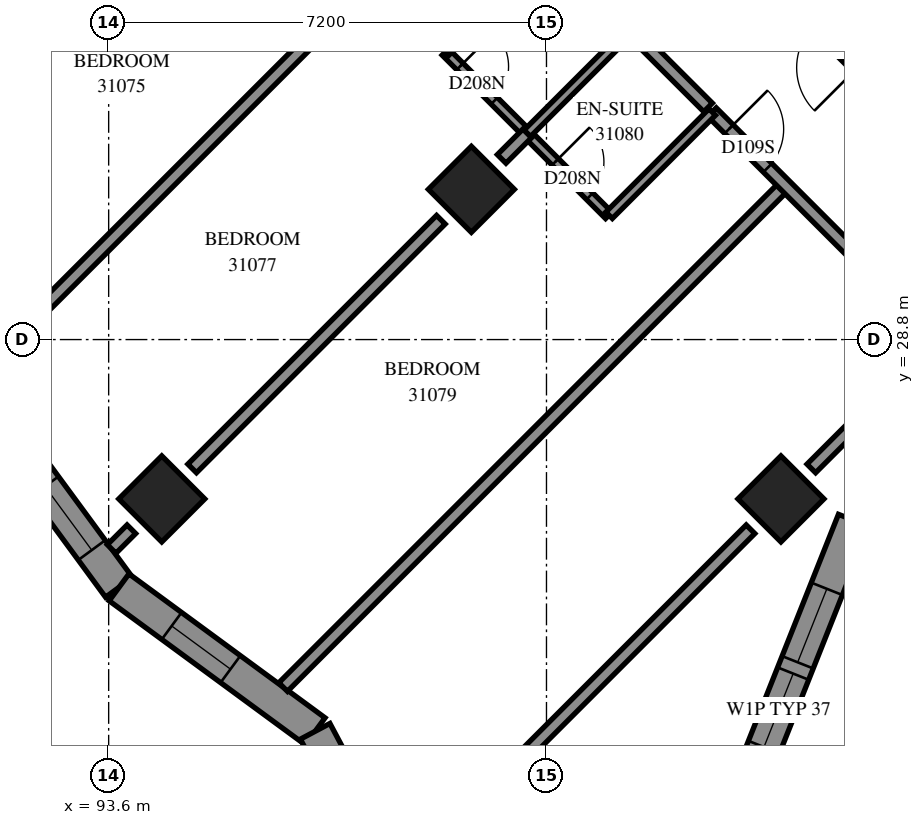
"""IFC4 building model, lengths in metres.
Left out: names, types, materials, properties, quantities, classifications, styles, units other than length and angle.
Written with IfcOpenShell. Run it as: python <this file> out.ifc"""

import sys

from ifc_helpers import new_model, si_unit, direction, frame, frame_2d, origin, origin_2d, place, context, subcontext, project, spatial, polyline, rectangle, outline, extrude, element, fill, save


model = new_model("IFC4")
c1 = context("Model", 3, precision=1e-05, world=origin(), true_north=direction((0.0, 1.0)))
c2 = subcontext(c1, "Body", "Model", "MODEL_VIEW")
j1 = project(units=[si_unit("LENGTHUNIT", "METRE"), si_unit("PLANEANGLEUNIT", "RADIAN")], contexts=[c1])
p1 = place(None, origin())
s1 = spatial("IfcSite", under=j1, at=p1, CompositionType="ELEMENT")
p2 = place(p1, origin())
s2 = spatial("IfcBuilding", under=s1, at=p2, CompositionType="ELEMENT")
p3 = place(p2, frame((0.0, 0.0, 115.2)))
s3 = spatial("IfcBuildingStorey", under=s2, at=p3, CompositionType="ELEMENT", Elevation=115.2)
for number, where, z_axis, x_axis in (
    (1, (99.565, 31.271, 0.0), (0.0, 0.0, 1.0), (0.707, -0.707, 0.0)),
    (2, (94.474, 26.18, 0.0), (0.0, 0.0, 1.0), (0.707, -0.707, 0.0)),
    (3, (104.656, 26.18, 0.0), (0.0, 0.0, 1.0), (0.707, -0.707, 0.0)),
):
    element("IfcColumn", number, at=place(p3, frame(where, z_axis=z_axis, x_axis=x_axis)), inside=s3, PredefinedType="COLUMN", context=c2, shape_type="SweptSolid", body=[
        extrude(rectangle(XDim=1.0, YDim=1.0, at=origin_2d()), origin(), (0.0, 0.0, 1.0), 3.1),
    ])
p4 = place(p3, frame((103.808, 20.667, 0.0), z_axis=(0.0, 0.0, 1.0), x_axis=(0.3692366636, 0.9293354003, 0.0)))
e4 = element("IfcWall", 4, at=p4, inside=s3, PredefinedType="SOLIDWALL", context=c2, shape_type="SweptSolid", body=[
    extrude(outline(polyline([(-0.124, -0.275), (5.431, -0.275), (5.668, 0.275), (0.124, 0.275), (-0.124, -0.275)])), origin(), (0.0, 0.0, 1.0), 3.1),
])
p5 = place(p4, frame((1.541, 0.0, 0.5)))
e5 = element("IfcOpeningElement", 5, at=p5, cuts=e4, PredefinedType="OPENING", context=c2, shape_type="SweptSolid", body=[
    extrude(rectangle(XDim=1.3, YDim=2.45, at=frame_2d((0.65, 1.225))), frame((0.0, 0.285, 0.0), z_axis=(0.0, -1.0, 0.0), x_axis=(1.0, 0.0, 0.0)), (0.0, 0.0, 1.0), 0.57),
])
p6 = place(p4, frame((3.041, 0.0, 0.5)))
e6 = element("IfcOpeningElement", 6, at=p6, cuts=e4, PredefinedType="OPENING", context=c2, shape_type="SweptSolid", body=[
    extrude(rectangle(XDim=1.3, YDim=2.45, at=frame_2d((0.65, 1.225))), frame((0.0, 0.285, 0.0), z_axis=(0.0, -1.0, 0.0), x_axis=(1.0, 0.0, 0.0)), (0.0, 0.0, 1.0), 0.57),
])
p7 = place(p3, frame((105.857, 25.825, 0.0), z_axis=(0.0, 0.0, 1.0), x_axis=(0.9293292169, 0.3692522262, 0.0)))
e7 = element("IfcWall", 7, at=p7, inside=s3, PredefinedType="SOLIDWALL", context=c2, shape_type="SweptSolid", body=[
    extrude(outline(polyline([(0.119, -0.275), (5.674, -0.275), (5.426, 0.275), (-0.119, 0.275), (0.119, -0.275)])), origin(), (0.0, 0.0, 1.0), 3.1),
])
p8 = place(p7, frame((0.653, 0.0, 0.5)))
e8 = element("IfcOpeningElement", 8, at=p8, cuts=e7, PredefinedType="OPENING", context=c2, shape_type="SweptSolid", body=[
    extrude(rectangle(XDim=1.2, YDim=2.45, at=frame_2d((0.6, 1.225))), frame((0.0, 0.285, 0.0), z_axis=(0.0, -1.0, 0.0), x_axis=(1.0, 0.0, 0.0)), (0.0, 0.0, 1.0), 0.57),
])
p9 = place(p7, frame((3.166, 0.0, 0.5)))
e9 = element("IfcOpeningElement", 9, at=p9, cuts=e7, PredefinedType="OPENING", context=c2, shape_type="SweptSolid", body=[
    extrude(rectangle(XDim=1.2, YDim=2.45, at=frame_2d((0.6, 1.225))), frame((0.0, 0.285, 0.0), z_axis=(0.0, -1.0, 0.0), x_axis=(1.0, 0.0, 0.0)), (0.0, 0.0, 1.0), 0.57),
])
p10 = place(p3, frame((91.415, 27.934, 0.0), z_axis=(0.0, 0.0, 1.0), x_axis=(0.5918046853, -0.8060813944, 0.0)))
e10 = element("IfcWall", 10, at=p10, inside=s3, PredefinedType="SOLIDWALL", context=c2, shape_type="SweptSolid", body=[
    extrude(outline(polyline([(0.042, -0.275), (4.022, -0.275), (3.938, 0.275), (-0.042, 0.275), (0.042, -0.275)])), origin(), (0.0, 0.0, 1.0), 3.1),
])
p11 = place(p10, frame((0.421, 0.0, 0.5)))
e11 = element("IfcOpeningElement", 11, at=p11, cuts=e10, PredefinedType="OPENING", context=c2, shape_type="SweptSolid", body=[
    extrude(rectangle(XDim=1.3, YDim=2.45, at=frame_2d((0.65, 1.225))), frame((0.0, 0.285, 0.0), z_axis=(0.0, -1.0, 0.0), x_axis=(1.0, 0.0, 0.0)), (0.0, 0.0, 1.0), 0.57),
])
p12 = place(p10, frame((1.921, 0.0, 0.5)))
e12 = element("IfcOpeningElement", 12, at=p12, cuts=e10, PredefinedType="OPENING", context=c2, shape_type="SweptSolid", body=[
    extrude(rectangle(XDim=1.3, YDim=2.45, at=frame_2d((0.65, 1.225))), frame((0.0, 0.285, 0.0), z_axis=(0.0, -1.0, 0.0), x_axis=(1.0, 0.0, 0.0)), (0.0, 0.0, 1.0), 0.57),
])
p13 = place(p3, frame((93.771, 24.726, 0.0), z_axis=(0.0, 0.0, 1.0), x_axis=(0.8060798805, -0.5918067474, 0.0)))
e13 = element("IfcWall", 13, at=p13, inside=s3, PredefinedType="SOLIDWALL", context=c2, shape_type="SweptSolid", body=[
    extrude(outline(polyline([(-0.042, -0.275), (3.938, -0.275), (4.064, 0.275), (0.042, 0.275), (-0.042, -0.275)])), origin(), (0.0, 0.0, 1.0), 3.1),
])
p14 = place(p13, frame((1.073, 0.0, 0.5)))
e14 = element("IfcOpeningElement", 14, at=p14, cuts=e13, PredefinedType="OPENING", context=c2, shape_type="SweptSolid", body=[
    extrude(rectangle(XDim=1.2, YDim=2.45, at=frame_2d((0.6, 1.225))), frame((0.0, 0.285, 0.0), z_axis=(0.0, -1.0, 0.0), x_axis=(1.0, 0.0, 0.0)), (0.0, 0.0, 1.0), 0.57),
])
p15 = place(p3, frame((96.996, 22.358, 0.0), z_axis=(0.0, 0.0, 1.0), x_axis=(0.469436121, -0.8829664367, 0.0)))
e15 = element("IfcWall", 15, at=p15, inside=s3, PredefinedType="SOLIDWALL", context=c2, shape_type="SweptSolid", body=[
    extrude(outline(polyline([(0.063, -0.275), (4.177, -0.275), (3.7, 0.275), (-0.063, 0.275), (0.063, -0.275)])), origin(), (0.0, 0.0, 1.0), 3.1),
])
p16 = place(p15, frame((0.919, 0.0, 0.5)))
e16 = element("IfcOpeningElement", 16, at=p16, cuts=e15, PredefinedType="OPENING", context=c2, shape_type="SweptSolid", body=[
    extrude(rectangle(XDim=1.2, YDim=2.45, at=frame_2d((0.6, 1.225))), frame((0.0, 0.285, 0.0), z_axis=(0.0, -1.0, 0.0), x_axis=(1.0, 0.0, 0.0)), (0.0, 0.0, 1.0), 0.57),
])
p17 = place(p3, frame((96.469, 23.086, 0.0), z_axis=(0.0, 0.0, 1.0), x_axis=(0.7071067812, 0.7071067812, 0.0)))
e17 = element("IfcWall", 17, at=p17, inside=s3, PredefinedType="PARTITIONING", context=c2, shape_type="SweptSolid", body=[
    extrude(rectangle(XDim=11.677, YDim=0.2, at=frame_2d((5.838, 0.0))), origin(), (0.0, 0.0, 1.0), 3.1),
])
p18 = place(p3, frame((86.33, 33.311, 0.0), z_axis=(0.0, 0.0, 1.0), x_axis=(0.7071067812, 0.7071067812, 0.0)))
e18 = element("IfcWall", 18, at=p18, inside=s3, PredefinedType="PARTITIONING", context=c2, shape_type="SweptSolid", body=[
    extrude(rectangle(XDim=11.616, YDim=0.2, at=frame_2d((5.808, 0.0))), origin(), (0.0, 0.0, 1.0), 3.1),
])
p19 = place(p3, frame((91.451, 28.249, 0.0), z_axis=(0.0, 0.0, 1.0), x_axis=(0.7071067812, 0.7071067812, 0.0)))
e19 = element("IfcWall", 19, at=p19, inside=s3, PredefinedType="PARTITIONING", context=c2, shape_type="SweptSolid", body=[
    extrude(rectangle(XDim=11.574, YDim=0.2, at=frame_2d((5.787, 0.0))), origin(), (0.0, 0.0, 1.0), 3.1),
])
p20 = place(p3, frame((108.831, 30.355, 0.0), z_axis=(0.0, 0.0, 1.0), x_axis=(-0.7073012053, 0.7069123036, 0.0)))
e20 = element("IfcWall", 20, at=p20, inside=s3, PredefinedType="PARTITIONING", context=c2, shape_type="SweptSolid", body=[
    extrude(rectangle(XDim=7.2, YDim=0.2, at=frame_2d((3.6, 0.0))), origin(), (0.0, 0.0, 1.0), 2.6),
])
p21 = place(p20, frame((4.125, 0.0, 0.0)))
e21 = element("IfcOpeningElement", 21, at=p21, cuts=e20, PredefinedType="OPENING", context=c2, shape_type="SweptSolid", body=[
    extrude(rectangle(XDim=1.0, YDim=2.1, at=frame_2d((0.5, 1.05))), frame((0.0, 0.11, 0.0), z_axis=(0.0, -1.0, 0.0), x_axis=(1.0, 0.0, 0.0)), (0.0, 0.0, 1.0), 0.22),
])
p22 = place(p20, frame((0.705, 0.0, 0.0)))
e22 = element("IfcOpeningElement", 22, at=p22, cuts=e20, PredefinedType="OPENING", context=c2, shape_type="SweptSolid", body=[
    extrude(rectangle(XDim=0.9, YDim=2.1, at=frame_2d((0.45, 1.05))), frame((0.0, 0.11, 0.0), z_axis=(0.0, -1.0, 0.0), x_axis=(1.0, 0.0, 0.0)), (0.0, 0.0, 1.0), 0.22),
])
p23 = place(p3, frame((89.881, 31.771, 0.0), z_axis=(0.0, 0.0, 1.0), x_axis=(0.7071067812, 0.7071067812, 0.0)))
e23 = element("IfcWall", 23, at=p23, inside=s3, PredefinedType="PARTITIONING", context=c2, shape_type="SweptSolid", body=[
    extrude(rectangle(XDim=5.787, YDim=0.2, at=frame_2d((2.893, 0.0))), origin(), (0.0, 0.0, 1.0), 3.1),
])
p24 = place(p3, frame((100.063, 21.589, 0.0), z_axis=(0.0, 0.0, 1.0), x_axis=(0.7071067812, 0.7071067812, 0.0)))
e24 = element("IfcWall", 24, at=p24, inside=s3, PredefinedType="PARTITIONING", context=c2, shape_type="SweptSolid", body=[
    extrude(rectangle(XDim=5.787, YDim=0.2, at=frame_2d((2.893, 0.0))), origin(), (0.0, 0.0, 1.0), 2.6),
])
p25 = place(p3, frame((94.973, 26.681, 0.0), z_axis=(0.0, 0.0, 1.0), x_axis=(0.7071067812, 0.7071067812, 0.0)))
e25 = element("IfcWall", 25, at=p25, inside=s3, PredefinedType="PARTITIONING", context=c2, shape_type="SweptSolid", body=[
    extrude(rectangle(XDim=5.784, YDim=0.2, at=frame_2d((2.892, 0.0))), origin(), (0.0, 0.0, 1.0), 3.1),
])
p26 = place(p3, frame((103.521, 32.541, 0.0), z_axis=(0.0, 0.0, 1.0), x_axis=(0.7071067812, -0.7071067812, 0.0)))
e26 = element("IfcWall", 26, at=p26, inside=s3, PredefinedType="PARTITIONING", context=c2, shape_type="SweptSolid", body=[
    extrude(rectangle(XDim=5.301, YDim=0.2, at=frame_2d((2.65, 0.0))), origin(), (0.0, 0.0, 1.0), 3.1),
])
p27 = place(p26, frame((0.396, 0.0, 0.0)))
e27 = element("IfcOpeningElement", 27, at=p27, cuts=e26, PredefinedType="OPENING", context=c2, shape_type="SweptSolid", body=[
    extrude(rectangle(XDim=0.9, YDim=2.1, at=frame_2d((0.45, 1.05))), frame((0.0, 0.11, 0.0), z_axis=(0.0, -1.0, 0.0), x_axis=(1.0, 0.0, 0.0)), (0.0, 0.0, 1.0), 0.22),
])
p28 = place(p3, frame((99.137, 33.531, 0.0), z_axis=(0.0, 0.0, 1.0), x_axis=(0.7071067812, -0.7071067812, 0.0)))
e28 = element("IfcWall", 28, at=p28, inside=s3, PredefinedType="PARTITIONING", context=c2, shape_type="SweptSolid", body=[
    extrude(rectangle(XDim=3.801, YDim=0.15, at=frame_2d((1.901, 0.0))), origin(), (0.0, 0.0, 1.0), 3.1),
])
p29 = place(p28, frame((0.339, 0.0, 0.0)))
e29 = element("IfcOpeningElement", 29, at=p29, cuts=e28, PredefinedType="OPENING", context=c2, shape_type="SweptSolid", body=[
    extrude(rectangle(XDim=0.8, YDim=2.1, at=frame_2d((0.4, 1.05))), frame((0.0, 0.085, 0.0), z_axis=(0.0, -1.0, 0.0), x_axis=(1.0, 0.0, 0.0)), (0.0, 0.0, 1.0), 0.17),
])
p30 = place(p28, frame((2.557, 0.0, 0.0)))
e30 = element("IfcOpeningElement", 30, at=p30, cuts=e28, PredefinedType="OPENING", context=c2, shape_type="SweptSolid", body=[
    extrude(rectangle(XDim=0.8, YDim=2.1, at=frame_2d((0.4, 1.05))), frame((0.0, 0.085, 0.0), z_axis=(0.0, -1.0, 0.0), x_axis=(1.0, 0.0, 0.0)), (0.0, 0.0, 1.0), 0.17),
])
p31 = place(p3, frame((105.155, 26.681, 0.0), z_axis=(0.0, 0.0, 1.0), x_axis=(0.7071067812, 0.7071067812, 0.0)))
e31 = element("IfcWall", 31, at=p31, inside=s3, PredefinedType="PARTITIONING", context=c2, shape_type="SweptSolid", body=[
    extrude(rectangle(XDim=2.993, YDim=0.2, at=frame_2d((1.496, 0.0))), origin(), (0.0, 0.0, 1.0), 2.6),
])
for number, where, z_axis, x_axis in (
    (32, (99.143, 33.531, 0.0), (0.0, 0.0, 1.0), (0.708, 0.707, 0.0)),
    (33, (101.83, 30.844, 0.0), (0.0, 0.0, 1.0), (0.707, 0.708, 0.0)),
):
    element("IfcWall", number, at=place(p3, frame(where, z_axis=z_axis, x_axis=x_axis)), inside=s3, PredefinedType="PARTITIONING", context=c2, shape_type="SweptSolid", body=[
        extrude(rectangle(XDim=2.4, YDim=0.15, at=frame_2d((1.2, 0.0))), origin(), (0.0, 0.0, 1.0), 3.1),
    ])
p32 = place(p3, frame((100.483, 32.191, 0.0), z_axis=(0.0, 0.0, 1.0), x_axis=(0.7071067812, 0.7071067812, 0.0)))
e34 = element("IfcWall", 34, at=p32, inside=s3, PredefinedType="PARTITIONING", context=c2, shape_type="SweptSolid", body=[
    extrude(rectangle(XDim=2.398, YDim=0.15, at=frame_2d((1.199, 0.0))), origin(), (0.0, 0.0, 1.0), 3.1),
])
p33 = place(p3, frame((102.183, 33.889, 0.0), z_axis=(0.0, 0.0, 1.0), x_axis=(0.7076620277, -0.7065510983, 0.0)))
e35 = element("IfcWall", 35, at=p33, inside=s3, PredefinedType="PARTITIONING", context=c2, shape_type="SweptSolid", body=[
    extrude(rectangle(XDim=1.8, YDim=0.2, at=frame_2d((0.9, 0.0))), origin(), (0.0, 0.0, 1.0), 3.1),
])
p34 = place(p3, frame((100.063, 31.771, 0.0), z_axis=(0.0, 0.0, 1.0), x_axis=(0.7071067812, 0.7071067812, 0.0)))
e36 = element("IfcWall", 36, at=p34, inside=s3, PredefinedType="PARTITIONING", context=c2, shape_type="SweptSolid", body=[
    extrude(rectangle(XDim=0.594, YDim=0.2, at=frame_2d((0.297, 0.0))), origin(), (0.0, 0.0, 1.0), 3.1),
])
p35 = place(p3, frame((93.649, 25.357, 0.0), z_axis=(0.0, 0.0, 1.0), x_axis=(0.7072158101, 0.7069977355, 0.0)))
e37 = element("IfcWall", 37, at=p35, inside=s3, PredefinedType="PARTITIONING", context=c2, shape_type="SweptSolid", body=[
    extrude(rectangle(XDim=0.459, YDim=0.2, at=frame_2d((0.229, 0.0))), origin(), (0.0, 0.0, 1.0), 3.1),
])
p36 = place(p5, origin())
e38 = element("IfcWindow", 38, at=p36, inside=s3, PartitioningType="SINGLE_PANEL", PredefinedType="WINDOW", context=c2, shape_type="SweptSolid", body=[
    extrude(rectangle(XDim=1.3, YDim=2.45, at=frame_2d((0.65, 1.225))), frame((0.0, 0.155, 0.0), z_axis=(0.0, -1.0, 0.0), x_axis=(1.0, 0.0, 0.0)), (0.0, 0.0, 1.0), 0.06),
])
fill(e5, e38)
p37 = place(p6, origin())
e39 = element("IfcWindow", 39, at=p37, inside=s3, PartitioningType="SINGLE_PANEL", PredefinedType="WINDOW", context=c2, shape_type="SweptSolid", body=[
    extrude(rectangle(XDim=1.3, YDim=2.45, at=frame_2d((0.65, 1.225))), frame((0.0, 0.155, 0.0), z_axis=(0.0, -1.0, 0.0), x_axis=(1.0, 0.0, 0.0)), (0.0, 0.0, 1.0), 0.06),
])
fill(e6, e39)
p38 = place(p12, origin())
e40 = element("IfcWindow", 40, at=p38, inside=s3, PartitioningType="SINGLE_PANEL", PredefinedType="WINDOW", context=c2, shape_type="SweptSolid", body=[
    extrude(rectangle(XDim=1.3, YDim=2.45, at=frame_2d((0.65, 1.225))), frame((0.0, 0.155, 0.0), z_axis=(0.0, -1.0, 0.0), x_axis=(1.0, 0.0, 0.0)), (0.0, 0.0, 1.0), 0.06),
])
fill(e12, e40)
p39 = place(p14, origin())
e41 = element("IfcWindow", 41, at=p39, inside=s3, PartitioningType="SINGLE_PANEL", PredefinedType="WINDOW", context=c2, shape_type="SweptSolid", body=[
    extrude(rectangle(XDim=1.2, YDim=2.45, at=frame_2d((0.6, 1.225))), frame((0.0, 0.155, 0.0), z_axis=(0.0, -1.0, 0.0), x_axis=(1.0, 0.0, 0.0)), (0.0, 0.0, 1.0), 0.06),
])
fill(e14, e41)
p40 = place(p21, origin())
e42 = element("IfcDoor", 42, at=p40, inside=s3, OperationType="SINGLE_SWING_LEFT", PredefinedType="DOOR", context=c2, shape_type="SweptSolid", body=[
    extrude(rectangle(XDim=1.0, YDim=2.1, at=frame_2d((0.5, 1.05))), frame((0.0, 0.025, 0.0), z_axis=(0.0, -1.0, 0.0), x_axis=(1.0, 0.0, 0.0)), (0.0, 0.0, 1.0), 0.05),
])
fill(e21, e42)
p41 = place(p29, origin())
e43 = element("IfcDoor", 43, at=p41, inside=s3, OperationType="SINGLE_SWING_RIGHT", PredefinedType="DOOR", context=c2, shape_type="SweptSolid", body=[
    extrude(rectangle(XDim=0.8, YDim=2.1, at=frame_2d((0.4, 1.05))), frame((0.0, 0.025, 0.0), z_axis=(0.0, -1.0, 0.0), x_axis=(1.0, 0.0, 0.0)), (0.0, 0.0, 1.0), 0.05),
])
fill(e29, e43)
p42 = place(p27, origin())
e44 = element("IfcDoor", 44, at=p42, inside=s3, OperationType="SINGLE_SWING_RIGHT", PredefinedType="DOOR", context=c2, shape_type="SweptSolid", body=[
    extrude(rectangle(XDim=0.9, YDim=2.1, at=frame_2d((0.45, 1.05))), frame((0.0, 0.025, 0.0), z_axis=(0.0, -1.0, 0.0), x_axis=(1.0, 0.0, 0.0)), (0.0, 0.0, 1.0), 0.05),
])
fill(e27, e44)
p43 = place(p30, origin())
e45 = element("IfcDoor", 45, at=p43, inside=s3, OperationType="SINGLE_SWING_RIGHT", PredefinedType="DOOR", context=c2, shape_type="SweptSolid", body=[
    extrude(rectangle(XDim=0.8, YDim=2.1, at=frame_2d((0.4, 1.05))), frame((0.0, 0.025, 0.0), z_axis=(0.0, -1.0, 0.0), x_axis=(1.0, 0.0, 0.0)), (0.0, 0.0, 1.0), 0.05),
])
fill(e30, e45)
save(model, sys.argv[1])
